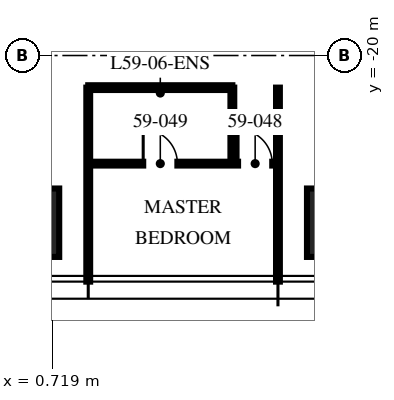
"""IFC4 building model, lengths in metres.
Left out: names, types, materials, properties, quantities, classifications, styles, units other than length and angle.
Written with IfcOpenShell. Run it as: python <this file> out.ifc"""

import sys

from ifc_helpers import new_model, si_unit, direction, frame, frame_2d, origin, origin_2d, place, context, subcontext, project, spatial, rectangle, extrude, element, fill, save


model = new_model("IFC4")
c1 = context("Model", 3, precision=1e-05, world=origin(), true_north=direction((0.0, 1.0)))
c2 = subcontext(c1, "Body", "Model", "MODEL_VIEW")
j1 = project(units=[si_unit("LENGTHUNIT", "METRE"), si_unit("PLANEANGLEUNIT", "RADIAN")], contexts=[c1])
p1 = place(None, origin())
s1 = spatial("IfcSite", under=j1, at=p1, CompositionType="ELEMENT")
p2 = place(p1, origin())
s2 = spatial("IfcBuilding", under=s1, at=p2, CompositionType="ELEMENT")
p3 = place(p2, frame((0.0, 0.0, 237.0)))
s3 = spatial("IfcBuildingStorey", under=s2, at=p3, CompositionType="ELEMENT", Elevation=237.0)
for number, where, z_axis, x_axis in (
    (1, (8.32, -24.4, 0.0), (0.0, 0.0, 1.0), (1.0, 0.0, 0.0)),
    (2, (0.0, -24.4, 0.0), (0.0, 0.0, 1.0), (1.0, 0.0, 0.0)),
):
    element("IfcColumn", number, at=place(p3, frame(where, z_axis=z_axis, x_axis=x_axis)), inside=s3, PredefinedType="COLUMN", context=c2, shape_type="SweptSolid", body=[
        extrude(rectangle(XDim=1.8, YDim=1.8, at=origin_2d()), origin(), (0.0, 0.0, 1.0), 3.75),
    ])
for number, where, z_axis, x_axis in (
    (3, (1.664, -20.845, 0.0), (0.0, 0.0, 1.0), (0.0, -1.0, 0.0)),
    (4, (6.656, -20.845, 0.0), (0.0, 0.0, 1.0), (0.0, -1.0, 0.0)),
):
    element("IfcWall", number, at=place(p3, frame(where, z_axis=z_axis, x_axis=x_axis)), inside=s3, PredefinedType="PARTITIONING", context=c2, shape_type="SweptSolid", body=[
        extrude(rectangle(XDim=5.105, YDim=0.1, at=frame_2d((2.552, 0.0))), origin(), (0.0, 0.0, 1.0), 2.91),
    ])
p4 = place(p3, frame((1.664, -22.845, 0.0), z_axis=(0.0, 0.0, 1.0), x_axis=(1.0, 0.0, 0.0)))
e5 = element("IfcWall", 5, at=p4, inside=s3, PredefinedType="PARTITIONING", context=c2, shape_type="SweptSolid", body=[
    extrude(rectangle(XDim=4.992, YDim=0.1, at=frame_2d((2.496, 0.0))), origin(), (0.0, 0.0, 1.0), 2.81),
])
p5 = place(p4, frame((3.942, 0.0, 0.0)))
e6 = element("IfcOpeningElement", 6, at=p5, cuts=e5, PredefinedType="OPENING", context=c2, shape_type="SweptSolid", body=[
    extrude(rectangle(XDim=0.9, YDim=2.1, at=frame_2d((0.45, 1.05))), frame((0.0, 0.06, 0.0), z_axis=(0.0, -1.0, 0.0), x_axis=(1.0, 0.0, 0.0)), (0.0, 0.0, 1.0), 0.12),
])
p6 = place(p4, frame((1.446, 0.0, 0.0)))
e7 = element("IfcOpeningElement", 7, at=p6, cuts=e5, PredefinedType="OPENING", context=c2, shape_type="SweptSolid", body=[
    extrude(rectangle(XDim=0.9, YDim=2.1, at=frame_2d((0.45, 1.05))), frame((0.0, 0.06, 0.0), z_axis=(0.0, -1.0, 0.0), x_axis=(1.0, 0.0, 0.0)), (0.0, 0.0, 1.0), 0.12),
])
p7 = place(p3, frame((5.456, -20.845, 0.0), z_axis=(0.0, 0.0, 1.0), x_axis=(0.0, -1.0, 0.0)))
e8 = element("IfcWall", 8, at=p7, inside=s3, PredefinedType="PARTITIONING", context=c2, shape_type="SweptSolid", body=[
    extrude(rectangle(XDim=2.0, YDim=0.1, at=frame_2d((1.0, 0.0))), origin(), (0.0, 0.0, 1.0), 3.5),
])
p8 = place(p3, frame((1.664, -20.845, 0.0), z_axis=(0.0, 0.0, 1.0), x_axis=(1.0, 0.0, 0.0)))
e9 = element("IfcWall", 9, at=p8, inside=s3, PredefinedType="PARTITIONING", context=c2, shape_type="SweptSolid", body=[
    extrude(rectangle(XDim=3.792, YDim=0.125, at=frame_2d((1.896, 0.0))), origin(), (0.0, 0.0, 1.0), 2.81),
])
p9 = place(p5, origin())
e10 = element("IfcDoor", 10, at=p9, inside=s3, OperationType="SINGLE_SWING_LEFT", PredefinedType="DOOR", context=c2, shape_type="SweptSolid", body=[
    extrude(rectangle(XDim=0.9, YDim=2.1, at=frame_2d((0.45, 1.05))), frame((0.0, 0.025, 0.0), z_axis=(0.0, -1.0, 0.0), x_axis=(1.0, 0.0, 0.0)), (0.0, 0.0, 1.0), 0.05),
])
fill(e6, e10)
p10 = place(p6, origin())
e11 = element("IfcDoor", 11, at=p10, inside=s3, OperationType="SINGLE_SWING_LEFT", PredefinedType="DOOR", context=c2, shape_type="SweptSolid", body=[
    extrude(rectangle(XDim=0.9, YDim=2.1, at=frame_2d((0.45, 1.05))), frame((0.0, 0.025, 0.0), z_axis=(0.0, -1.0, 0.0), x_axis=(1.0, 0.0, 0.0)), (0.0, 0.0, 1.0), 0.05),
])
fill(e7, e11)
save(model, sys.argv[1])
